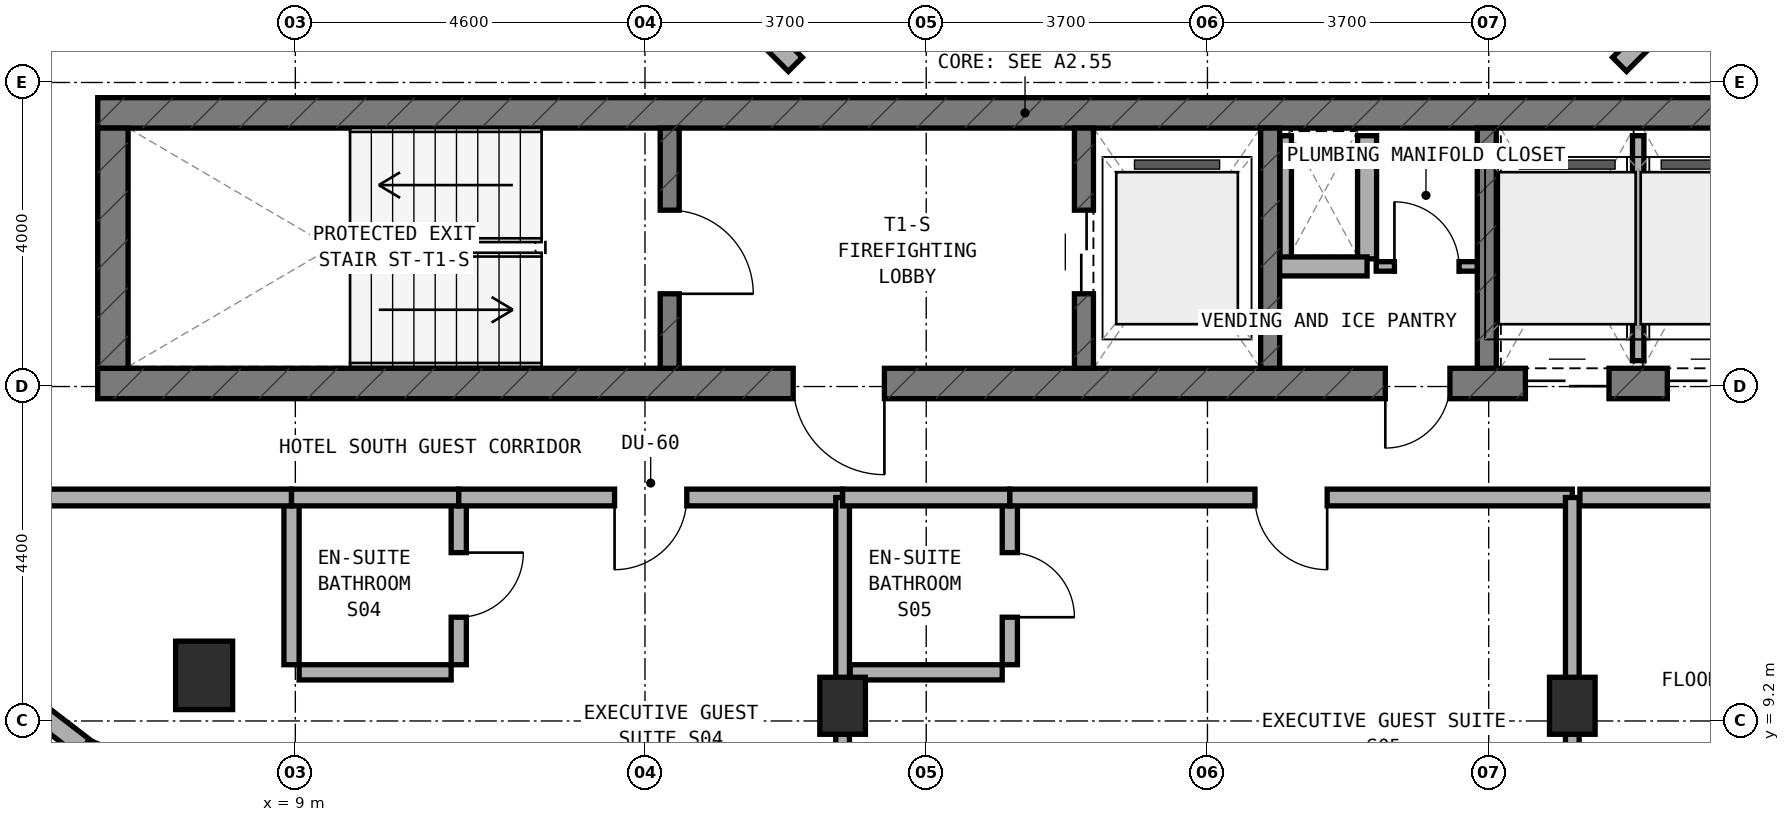
"""IFC4 building model, lengths in metres.
Left out: names, types, materials, properties, quantities, classifications, styles, units other than length and angle.
Written with IfcOpenShell. Run it as: python <this file> out.ifc"""

import sys

from ifc_helpers import new_model, si_unit, direction, frame, frame_2d, origin, origin_2d, place, context, subcontext, project, spatial, rectangle, extrude, element, fill, save


model = new_model("IFC4")
c1 = context("Model", 3, precision=1e-05, world=origin(), true_north=direction((0.0, 1.0)))
c2 = subcontext(c1, "Body", "Model", "MODEL_VIEW")
j1 = project(units=[si_unit("LENGTHUNIT", "METRE"), si_unit("PLANEANGLEUNIT", "RADIAN")], contexts=[c1])
p1 = place(None, origin())
s1 = spatial("IfcSite", under=j1, at=p1, CompositionType="ELEMENT")
p2 = place(p1, origin())
s2 = spatial("IfcBuilding", under=s1, at=p2, CompositionType="ELEMENT")
p3 = place(p2, frame((0.0, 0.0, 254.0)))
s3 = spatial("IfcBuildingStorey", under=s2, at=p3, CompositionType="ELEMENT", Elevation=254.0)
p4 = place(p3, frame((6.4, 13.64, 0.0), z_axis=(0.0, 0.0, 1.0), x_axis=(1.0, 0.0, 0.0)))
e1 = element("IfcWall", 1, at=p4, inside=s3, PredefinedType="SHEAR", context=c2, shape_type="SweptSolid", body=[
    extrude(rectangle(XDim=24.4, YDim=0.4, at=frame_2d((12.2, 0.0))), origin(), (0.0, 0.0, 1.0), 3.6),
])
p5 = place(p4, frame((9.15, 0.0, 0.0)))
e2 = element("IfcOpeningElement", 2, at=p5, cuts=e1, PredefinedType="OPENING", context=c2, shape_type="SweptSolid", body=[
    extrude(rectangle(XDim=1.2, YDim=2.15, at=frame_2d((0.6, 1.075))), frame((0.0, 0.21, 0.0), z_axis=(0.0, -1.0, 0.0), x_axis=(1.0, 0.0, 0.0)), (0.0, 0.0, 1.0), 0.42),
])
p6 = place(p4, frame((16.94, 0.0, 0.0)))
e3 = element("IfcOpeningElement", 3, at=p6, cuts=e1, PredefinedType="OPENING", context=c2, shape_type="SweptSolid", body=[
    extrude(rectangle(XDim=0.85, YDim=2.1, at=frame_2d((0.425, 1.05))), frame((0.0, 0.21, 0.0), z_axis=(0.0, -1.0, 0.0), x_axis=(1.0, 0.0, 0.0)), (0.0, 0.0, 1.0), 0.42),
])
p7 = place(p4, frame((18.783, 0.0, 0.0)))
e4 = element("IfcOpeningElement", 4, at=p7, cuts=e1, PredefinedType="OPENING", context=c2, shape_type="SweptSolid", body=[
    extrude(rectangle(XDim=1.1, YDim=2.15, at=frame_2d((0.55, 1.075))), frame((0.0, 0.21, 0.0), z_axis=(0.0, -1.0, 0.0), x_axis=(1.0, 0.0, 0.0)), (0.0, 0.0, 1.0), 0.42),
])
p8 = place(p4, frame((20.65, 0.0, 0.0)))
e5 = element("IfcOpeningElement", 5, at=p8, cuts=e1, PredefinedType="OPENING", context=c2, shape_type="SweptSolid", body=[
    extrude(rectangle(XDim=1.1, YDim=2.15, at=frame_2d((0.55, 1.075))), frame((0.0, 0.21, 0.0), z_axis=(0.0, -1.0, 0.0), x_axis=(1.0, 0.0, 0.0)), (0.0, 0.0, 1.0), 0.42),
])
p9 = place(p4, frame((22.517, 0.0, 0.0)))
e6 = element("IfcOpeningElement", 6, at=p9, cuts=e1, PredefinedType="OPENING", context=c2, shape_type="SweptSolid", body=[
    extrude(rectangle(XDim=1.1, YDim=2.15, at=frame_2d((0.55, 1.075))), frame((0.0, 0.21, 0.0), z_axis=(0.0, -1.0, 0.0), x_axis=(1.0, 0.0, 0.0)), (0.0, 0.0, 1.0), 0.42),
])
p10 = place(p3, frame((6.4, 17.2, 0.0), z_axis=(0.0, 0.0, 1.0), x_axis=(1.0, 0.0, 0.0)))
e7 = element("IfcWall", 7, at=p10, inside=s3, PredefinedType="SHEAR", context=c2, shape_type="SweptSolid", body=[
    extrude(rectangle(XDim=24.4, YDim=0.4, at=frame_2d((12.2, 0.0))), origin(), (0.0, 0.0, 1.0), 3.6),
])
p11 = place(p3, frame((6.6, 13.84, 0.0), z_axis=(0.0, 0.0, 1.0), x_axis=(0.0, 1.0, 0.0)))
e8 = element("IfcWall", 8, at=p11, inside=s3, PredefinedType="SHEAR", context=c2, shape_type="SweptSolid", body=[
    extrude(rectangle(XDim=3.16, YDim=0.4, at=frame_2d((1.58, 0.0))), origin(), (0.0, 0.0, 1.0), 3.6),
])
p12 = place(p3, frame((13.925, 13.84, 0.0), z_axis=(0.0, 0.0, 1.0), x_axis=(0.0, 1.0, 0.0)))
e9 = element("IfcWall", 9, at=p12, inside=s3, PredefinedType="STANDARD", context=c2, shape_type="SweptSolid", body=[
    extrude(rectangle(XDim=3.16, YDim=0.25, at=frame_2d((1.58, 0.0))), origin(), (0.0, 0.0, 1.0), 3.32),
])
p13 = place(p12, frame((0.98, 0.0, 0.0)))
e10 = element("IfcOpeningElement", 10, at=p13, cuts=e9, PredefinedType="OPENING", context=c2, shape_type="SweptSolid", body=[
    extrude(rectangle(XDim=1.1, YDim=2.15, at=frame_2d((0.55, 1.075))), frame((0.0, 0.135, 0.0), z_axis=(0.0, -1.0, 0.0), x_axis=(1.0, 0.0, 0.0)), (0.0, 0.0, 1.0), 0.27),
])
p14 = place(p3, frame((19.375, 13.84, 0.0), z_axis=(0.0, 0.0, 1.0), x_axis=(0.0, 1.0, 0.0)))
e11 = element("IfcWall", 11, at=p14, inside=s3, PredefinedType="STANDARD", context=c2, shape_type="SweptSolid", body=[
    extrude(rectangle(XDim=3.16, YDim=0.25, at=frame_2d((1.58, 0.0))), origin(), (0.0, 0.0, 1.0), 3.32),
])
p15 = place(p14, frame((0.98, 0.0, 0.0)))
e12 = element("IfcOpeningElement", 12, at=p15, cuts=e11, PredefinedType="OPENING", context=c2, shape_type="SweptSolid", body=[
    extrude(rectangle(XDim=1.1, YDim=2.15, at=frame_2d((0.55, 1.075))), frame((0.0, 0.135, 0.0), z_axis=(0.0, -1.0, 0.0), x_axis=(1.0, 0.0, 0.0)), (0.0, 0.0, 1.0), 0.27),
])
for number, where, z_axis, x_axis in (
    (13, (21.825, 13.84, 0.0), (0.0, 0.0, 1.0), (0.0, 1.0, 0.0)),
    (14, (24.675, 13.84, 0.0), (0.0, 0.0, 1.0), (0.0, 1.0, 0.0)),
):
    element("IfcWall", number, at=place(p3, frame(where, z_axis=z_axis, x_axis=x_axis)), inside=s3, PredefinedType="STANDARD", context=c2, shape_type="SweptSolid", body=[
        extrude(rectangle(XDim=3.16, YDim=0.25, at=frame_2d((1.58, 0.0))), origin(), (0.0, 0.0, 1.0), 3.32),
    ])
for number, where, z_axis, x_axis in (
    (15, (16.2, 9.4, 0.0), (0.0, 0.0, 1.0), (1.0, 0.0, 0.0)),
    (16, (25.8, 9.4, 0.0), (0.0, 0.0, 1.0), (1.0, 0.0, 0.0)),
):
    element("IfcColumn", number, at=place(p3, frame(where, z_axis=z_axis, x_axis=x_axis)), inside=s3, PredefinedType="COLUMN", context=c2, shape_type="SweptSolid", body=[
        extrude(rectangle(XDim=0.6, YDim=0.75, at=origin_2d()), origin(), (0.0, 0.0, 1.0), 3.6),
    ])
p16 = place(p3, frame((7.8, 9.8, 0.0), z_axis=(0.0, 0.0, 1.0), x_axis=(1.0, 0.0, 0.0)))
e17 = element("IfcColumn", 17, at=p16, inside=s3, PredefinedType="COLUMN", context=c2, shape_type="SweptSolid", body=[
    extrude(rectangle(XDim=0.75, YDim=0.9, at=origin_2d()), origin(), (0.0, 0.0, 1.0), 3.6),
])
p17 = place(p3, frame((5.638, 9.297, 0.0), z_axis=(0.0, 0.0, 1.0), x_axis=(0.793158129381, -0.609015748398, 0.0)))
e18 = element("IfcWall", 18, at=p17, inside=s3, PredefinedType="STANDARD", context=c2, shape_type="SweptSolid", body=[
    extrude(rectangle(XDim=0.798, YDim=0.26, at=frame_2d((0.399, 0.0))), origin(), (0.0, 0.0, 1.0), 3.32),
])
p18 = place(p3, frame((6.227, 8.832, 0.0), z_axis=(0.0, 0.0, 1.0), x_axis=(0.923681457047, -0.383161279238, 0.0)))
e19 = element("IfcWall", 19, at=p18, inside=s3, PredefinedType="STANDARD", context=c2, shape_type="SweptSolid", body=[
    extrude(rectangle(XDim=0.799, YDim=0.26, at=frame_2d((0.399, 0.0))), origin(), (0.0, 0.0, 1.0), 3.32),
])
for number, where, z_axis, x_axis in (
    (20, (26.422, 17.838, 0.0), (0.0, 0.0, 1.0), (0.707, 0.707, 0.0)),
    (21, (13.944, 19.472, 0.0), (0.0, 0.0, 1.0), (0.707, -0.707, 0.0)),
):
    element("IfcWall", number, at=place(p3, frame(where, z_axis=z_axis, x_axis=x_axis)), inside=s3, PredefinedType="STANDARD", context=c2, shape_type="SweptSolid", body=[
        extrude(rectangle(XDim=2.311, YDim=0.26, at=frame_2d((1.155, 0.0))), origin(), (0.0, 0.0, 1.0), 3.32),
    ])
p19 = place(p3, frame((22.03, 15.28, 0.0), z_axis=(0.0, 0.0, 1.0), x_axis=(0.0, 1.0, 0.0)))
e22 = element("IfcWall", 22, at=p19, inside=s3, PredefinedType="PARTITIONING", context=c2, shape_type="SweptSolid", body=[
    extrude(rectangle(XDim=1.62, YDim=0.15, at=frame_2d((0.81, 0.0))), origin(), (0.0, 0.0, 1.0), 3.32),
])
p20 = place(p3, frame((23.1, 15.28, 0.0), z_axis=(0.0, 0.0, 1.0), x_axis=(0.0, 1.0, 0.0)))
e23 = element("IfcWall", 23, at=p20, inside=s3, PredefinedType="SOLIDWALL", context=c2, shape_type="SweptSolid", body=[
    extrude(rectangle(XDim=1.62, YDim=0.25, at=frame_2d((0.81, 0.0))), origin(), (0.0, 0.0, 1.0), 3.32),
])
p21 = place(p3, frame((21.95, 15.18, 0.0), z_axis=(0.0, 0.0, 1.0), x_axis=(1.0, 0.0, 0.0)))
e24 = element("IfcWall", 24, at=p21, inside=s3, PredefinedType="SOLIDWALL", context=c2, shape_type="SweptSolid", body=[
    extrude(rectangle(XDim=1.15, YDim=0.25, at=frame_2d((0.575, 0.0))), origin(), (0.0, 0.0, 1.0), 3.32),
])
p22 = place(p3, frame((23.22, 15.18, 0.0), z_axis=(0.0, 0.0, 1.0), x_axis=(1.0, 0.0, 0.0)))
e25 = element("IfcWall", 25, at=p22, inside=s3, PredefinedType="PARTITIONING", context=c2, shape_type="SweptSolid", body=[
    extrude(rectangle(XDim=1.33, YDim=0.125, at=frame_2d((0.665, 0.0))), origin(), (0.0, 0.0, 1.0), 3.32),
])
p23 = place(p22, frame((0.24, 0.0, 0.0)))
e26 = element("IfcOpeningElement", 26, at=p23, cuts=e25, PredefinedType="OPENING", context=c2, shape_type="SweptSolid", body=[
    extrude(rectangle(XDim=0.85, YDim=2.1, at=frame_2d((0.425, 1.05))), frame((0.0, 0.073, 0.0), z_axis=(0.0, -1.0, 0.0), x_axis=(1.0, 0.0, 0.0)), (0.0, 0.0, 1.0), 0.145),
])
p24 = place(p3, frame((26.667, 13.94, 0.0), z_axis=(0.0, 0.0, 1.0), x_axis=(0.0, 1.0, 0.0)))
e27 = element("IfcWall", 27, at=p24, inside=s3, PredefinedType="PARTITIONING", context=c2, shape_type="SweptSolid", body=[
    extrude(rectangle(XDim=2.96, YDim=0.15, at=frame_2d((1.48, 0.0))), origin(), (0.0, 0.0, 1.0), 3.32),
])
p25 = place(p3, frame((11.15, 9.94, 0.0), z_axis=(0.0, 0.0, 1.0), x_axis=(0.0, 1.0, 0.0)))
e28 = element("IfcWall", 28, at=p25, inside=s3, PredefinedType="PLUMBINGWALL", context=c2, shape_type="SweptSolid", body=[
    extrude(rectangle(XDim=2.1, YDim=0.2, at=frame_2d((1.05, 0.0))), origin(), (0.0, 0.0, 1.0), 2.845),
])
p26 = place(p25, frame((0.625, 0.0, 0.0)))
e29 = element("IfcOpeningElement", 29, at=p26, cuts=e28, PredefinedType="OPENING", context=c2, shape_type="SweptSolid", body=[
    extrude(rectangle(XDim=0.85, YDim=2.1, at=frame_2d((0.425, 1.05))), frame((0.0, 0.11, 0.0), z_axis=(0.0, -1.0, 0.0), x_axis=(1.0, 0.0, 0.0)), (0.0, 0.0, 1.0), 0.22),
])
p27 = place(p3, frame((9.05, 9.84, 0.0), z_axis=(0.0, 0.0, 1.0), x_axis=(1.0, 0.0, 0.0)))
e30 = element("IfcWall", 30, at=p27, inside=s3, PredefinedType="PLUMBINGWALL", context=c2, shape_type="SweptSolid", body=[
    extrude(rectangle(XDim=2.0, YDim=0.2, at=frame_2d((1.0, 0.0))), origin(), (0.0, 0.0, 1.0), 3.015),
])
p28 = place(p3, frame((8.95, 9.94, 0.0), z_axis=(0.0, 0.0, 1.0), x_axis=(0.0, 1.0, 0.0)))
e31 = element("IfcWall", 31, at=p28, inside=s3, PredefinedType="PLUMBINGWALL", context=c2, shape_type="SweptSolid", body=[
    extrude(rectangle(XDim=2.1, YDim=0.2, at=frame_2d((1.05, 0.0))), origin(), (0.0, 0.0, 1.0), 2.845),
])
p29 = place(p3, frame((3.36, 12.14, 0.0), z_axis=(0.0, 0.0, 1.0), x_axis=(1.0, 0.0, 0.0)))
e32 = element("IfcWall", 32, at=p29, inside=s3, PredefinedType="SOLIDWALL", context=c2, shape_type="SweptSolid", body=[
    extrude(rectangle(XDim=5.59, YDim=0.22, at=frame_2d((2.795, 0.0))), origin(), (0.0, 0.0, 1.0), 2.745),
])
p30 = place(p3, frame((8.95, 12.14, 0.0), z_axis=(0.0, 0.0, 1.0), x_axis=(1.0, 0.0, 0.0)))
e33 = element("IfcWall", 33, at=p30, inside=s3, PredefinedType="SOLIDWALL", context=c2, shape_type="SweptSolid", body=[
    extrude(rectangle(XDim=2.2, YDim=0.22, at=frame_2d((1.1, 0.0))), origin(), (0.0, 0.0, 1.0), 3.32),
])
p31 = place(p3, frame((11.15, 12.14, 0.0), z_axis=(0.0, 0.0, 1.0), x_axis=(1.0, 0.0, 0.0)))
e34 = element("IfcWall", 34, at=p31, inside=s3, PredefinedType="SOLIDWALL", context=c2, shape_type="SweptSolid", body=[
    extrude(rectangle(XDim=5.05, YDim=0.22, at=frame_2d((2.525, 0.0))), origin(), (0.0, 0.0, 1.0), 2.745),
])
p32 = place(p31, frame((2.05, 0.0, 0.0)))
e35 = element("IfcOpeningElement", 35, at=p32, cuts=e34, PredefinedType="OPENING", context=c2, shape_type="SweptSolid", body=[
    extrude(rectangle(XDim=0.95, YDim=2.1, at=frame_2d((0.475, 1.05))), frame((0.0, 0.12, 0.0), z_axis=(0.0, -1.0, 0.0), x_axis=(1.0, 0.0, 0.0)), (0.0, 0.0, 1.0), 0.24),
])
p33 = place(p3, frame((16.2, 6.86, 0.0), z_axis=(0.0, 0.0, 1.0), x_axis=(0.0, 1.0, 0.0)))
e36 = element("IfcWall", 36, at=p33, inside=s3, PredefinedType="SOLIDWALL", context=c2, shape_type="SweptSolid", body=[
    extrude(rectangle(XDim=5.28, YDim=0.18, at=frame_2d((2.64, 0.0))), origin(), (0.0, 0.0, 1.0), 2.745),
])
p34 = place(p3, frame((18.4, 9.94, 0.0), z_axis=(0.0, 0.0, 1.0), x_axis=(0.0, 1.0, 0.0)))
e37 = element("IfcWall", 37, at=p34, inside=s3, PredefinedType="PLUMBINGWALL", context=c2, shape_type="SweptSolid", body=[
    extrude(rectangle(XDim=2.1, YDim=0.2, at=frame_2d((1.05, 0.0))), origin(), (0.0, 0.0, 1.0), 2.845),
])
p35 = place(p34, frame((0.625, 0.0, 0.0)))
e38 = element("IfcOpeningElement", 38, at=p35, cuts=e37, PredefinedType="OPENING", context=c2, shape_type="SweptSolid", body=[
    extrude(rectangle(XDim=0.85, YDim=2.1, at=frame_2d((0.425, 1.05))), frame((0.0, 0.11, 0.0), z_axis=(0.0, -1.0, 0.0), x_axis=(1.0, 0.0, 0.0)), (0.0, 0.0, 1.0), 0.22),
])
p36 = place(p3, frame((16.3, 9.84, 0.0), z_axis=(0.0, 0.0, 1.0), x_axis=(1.0, 0.0, 0.0)))
e39 = element("IfcWall", 39, at=p36, inside=s3, PredefinedType="PLUMBINGWALL", context=c2, shape_type="SweptSolid", body=[
    extrude(rectangle(XDim=2.0, YDim=0.2, at=frame_2d((1.0, 0.0))), origin(), (0.0, 0.0, 1.0), 3.32),
])
p37 = place(p3, frame((16.2, 12.14, 0.0), z_axis=(0.0, 0.0, 1.0), x_axis=(1.0, 0.0, 0.0)))
e40 = element("IfcWall", 40, at=p37, inside=s3, PredefinedType="SOLIDWALL", context=c2, shape_type="SweptSolid", body=[
    extrude(rectangle(XDim=2.2, YDim=0.22, at=frame_2d((1.1, 0.0))), origin(), (0.0, 0.0, 1.0), 2.745),
])
p38 = place(p3, frame((18.4, 12.14, 0.0), z_axis=(0.0, 0.0, 1.0), x_axis=(1.0, 0.0, 0.0)))
e41 = element("IfcWall", 41, at=p38, inside=s3, PredefinedType="SOLIDWALL", context=c2, shape_type="SweptSolid", body=[
    extrude(rectangle(XDim=7.4, YDim=0.22, at=frame_2d((3.7, 0.0))), origin(), (0.0, 0.0, 1.0), 2.745),
])
p39 = place(p38, frame((3.225, 0.0, 0.0)))
e42 = element("IfcOpeningElement", 42, at=p39, cuts=e41, PredefinedType="OPENING", context=c2, shape_type="SweptSolid", body=[
    extrude(rectangle(XDim=0.95, YDim=2.1, at=frame_2d((0.475, 1.05))), frame((0.0, 0.12, 0.0), z_axis=(0.0, -1.0, 0.0), x_axis=(1.0, 0.0, 0.0)), (0.0, 0.0, 1.0), 0.24),
])
p40 = place(p3, frame((25.8, 6.86, 0.0), z_axis=(0.0, 0.0, 1.0), x_axis=(0.0, 1.0, 0.0)))
e43 = element("IfcWall", 43, at=p40, inside=s3, PredefinedType="SOLIDWALL", context=c2, shape_type="SweptSolid", body=[
    extrude(rectangle(XDim=5.28, YDim=0.18, at=frame_2d((2.64, 0.0))), origin(), (0.0, 0.0, 1.0), 2.745),
])
p41 = place(p3, frame((25.9, 12.14, 0.0), z_axis=(0.0, 0.0, 1.0), x_axis=(1.0, 0.0, 0.0)))
e44 = element("IfcWall", 44, at=p41, inside=s3, PredefinedType="SOLIDWALL", context=c2, shape_type="SweptSolid", body=[
    extrude(rectangle(XDim=12.64, YDim=0.22, at=frame_2d((6.32, 0.0))), origin(), (0.0, 0.0, 1.0), 2.745),
])
p42 = place(p41, frame((5.251, 0.0, 0.0)))
e45 = element("IfcOpeningElement", 45, at=p42, cuts=e44, PredefinedType="OPENING", context=c2, shape_type="SweptSolid", body=[
    extrude(rectangle(XDim=0.95, YDim=2.1, at=frame_2d((0.475, 1.05))), frame((0.0, 0.12, 0.0), z_axis=(0.0, -1.0, 0.0), x_axis=(1.0, 0.0, 0.0)), (0.0, 0.0, 1.0), 0.24),
])
p43 = place(p13, frame((1.1, 0.0, 0.0), z_axis=(0.0, 0.0, 1.0), x_axis=(-1.0, 0.0, 0.0)))
e46 = element("IfcDoor", 46, at=p43, inside=s3, OperationType="SINGLE_SWING_RIGHT", PredefinedType="DOOR", context=c2, shape_type="SweptSolid", body=[
    extrude(rectangle(XDim=1.1, YDim=2.15, at=frame_2d((0.55, 1.075))), frame((0.0, 0.025, 0.0), z_axis=(0.0, -1.0, 0.0), x_axis=(1.0, 0.0, 0.0)), (0.0, 0.0, 1.0), 0.05),
])
fill(e10, e46)
p44 = place(p5, frame((1.2, 0.0, 0.0), z_axis=(0.0, 0.0, 1.0), x_axis=(-1.0, 0.0, 0.0)))
e47 = element("IfcDoor", 47, at=p44, inside=s3, OperationType="SINGLE_SWING_LEFT", PredefinedType="DOOR", context=c2, shape_type="SweptSolid", body=[
    extrude(rectangle(XDim=1.2, YDim=2.15, at=frame_2d((0.6, 1.075))), frame((0.0, 0.025, 0.0), z_axis=(0.0, -1.0, 0.0), x_axis=(1.0, 0.0, 0.0)), (0.0, 0.0, 1.0), 0.05),
])
fill(e2, e47)
p45 = place(p15, origin())
e48 = element("IfcDoor", 48, at=p45, inside=s3, OperationType="DOUBLE_DOOR_SLIDING", PredefinedType="DOOR", context=c2, shape_type="SweptSolid", body=[
    extrude(rectangle(XDim=1.1, YDim=2.15, at=frame_2d((0.55, 1.075))), frame((0.0, 0.025, 0.0), z_axis=(0.0, -1.0, 0.0), x_axis=(1.0, 0.0, 0.0)), (0.0, 0.0, 1.0), 0.05),
])
fill(e12, e48)
p46 = place(p6, frame((0.85, 0.0, 0.0), z_axis=(0.0, 0.0, 1.0), x_axis=(-1.0, 0.0, 0.0)))
e49 = element("IfcDoor", 49, at=p46, inside=s3, OperationType="SINGLE_SWING_RIGHT", PredefinedType="DOOR", context=c2, shape_type="SweptSolid", body=[
    extrude(rectangle(XDim=0.85, YDim=2.1, at=frame_2d((0.425, 1.05))), frame((0.0, 0.025, 0.0), z_axis=(0.0, -1.0, 0.0), x_axis=(1.0, 0.0, 0.0)), (0.0, 0.0, 1.0), 0.05),
])
fill(e3, e49)
p47 = place(p7, frame((1.1, 0.0, 0.0), z_axis=(0.0, 0.0, 1.0), x_axis=(-1.0, 0.0, 0.0)))
e50 = element("IfcDoor", 50, at=p47, inside=s3, OperationType="DOUBLE_DOOR_SLIDING", PredefinedType="DOOR", context=c2, shape_type="SweptSolid", body=[
    extrude(rectangle(XDim=1.1, YDim=2.15, at=frame_2d((0.55, 1.075))), frame((0.0, 0.025, 0.0), z_axis=(0.0, -1.0, 0.0), x_axis=(1.0, 0.0, 0.0)), (0.0, 0.0, 1.0), 0.05),
])
fill(e4, e50)
p48 = place(p8, frame((1.1, 0.0, 0.0), z_axis=(0.0, 0.0, 1.0), x_axis=(-1.0, 0.0, 0.0)))
e51 = element("IfcDoor", 51, at=p48, inside=s3, OperationType="DOUBLE_DOOR_SLIDING", PredefinedType="DOOR", context=c2, shape_type="SweptSolid", body=[
    extrude(rectangle(XDim=1.1, YDim=2.15, at=frame_2d((0.55, 1.075))), frame((0.0, 0.025, 0.0), z_axis=(0.0, -1.0, 0.0), x_axis=(1.0, 0.0, 0.0)), (0.0, 0.0, 1.0), 0.05),
])
fill(e5, e51)
p49 = place(p23, origin())
e52 = element("IfcDoor", 52, at=p49, inside=s3, OperationType="SINGLE_SWING_LEFT", PredefinedType="DOOR", context=c2, shape_type="SweptSolid", body=[
    extrude(rectangle(XDim=0.85, YDim=2.1, at=frame_2d((0.425, 1.05))), frame((0.0, 0.025, 0.0), z_axis=(0.0, -1.0, 0.0), x_axis=(1.0, 0.0, 0.0)), (0.0, 0.0, 1.0), 0.05),
])
fill(e26, e52)
p50 = place(p26, frame((0.85, 0.0, 0.0), z_axis=(0.0, 0.0, 1.0), x_axis=(-1.0, 0.0, 0.0)))
e53 = element("IfcDoor", 53, at=p50, inside=s3, OperationType="SINGLE_SWING_LEFT", PredefinedType="DOOR", context=c2, shape_type="SweptSolid", body=[
    extrude(rectangle(XDim=0.85, YDim=2.1, at=frame_2d((0.425, 1.05))), frame((0.0, 0.025, 0.0), z_axis=(0.0, -1.0, 0.0), x_axis=(1.0, 0.0, 0.0)), (0.0, 0.0, 1.0), 0.05),
])
fill(e29, e53)
p51 = place(p32, frame((0.95, 0.0, 0.0), z_axis=(0.0, 0.0, 1.0), x_axis=(-1.0, 0.0, 0.0)))
e54 = element("IfcDoor", 54, at=p51, inside=s3, OperationType="SINGLE_SWING_RIGHT", PredefinedType="DOOR", context=c2, shape_type="SweptSolid", body=[
    extrude(rectangle(XDim=0.95, YDim=2.1, at=frame_2d((0.475, 1.05))), frame((0.0, 0.025, 0.0), z_axis=(0.0, -1.0, 0.0), x_axis=(1.0, 0.0, 0.0)), (0.0, 0.0, 1.0), 0.05),
])
fill(e35, e54)
p52 = place(p35, frame((0.85, 0.0, 0.0), z_axis=(0.0, 0.0, 1.0), x_axis=(-1.0, 0.0, 0.0)))
e55 = element("IfcDoor", 55, at=p52, inside=s3, OperationType="SINGLE_SWING_RIGHT", PredefinedType="DOOR", context=c2, shape_type="SweptSolid", body=[
    extrude(rectangle(XDim=0.85, YDim=2.1, at=frame_2d((0.425, 1.05))), frame((0.0, 0.025, 0.0), z_axis=(0.0, -1.0, 0.0), x_axis=(1.0, 0.0, 0.0)), (0.0, 0.0, 1.0), 0.05),
])
fill(e38, e55)
p53 = place(p39, frame((0.95, 0.0, 0.0), z_axis=(0.0, 0.0, 1.0), x_axis=(-1.0, 0.0, 0.0)))
e56 = element("IfcDoor", 56, at=p53, inside=s3, OperationType="SINGLE_SWING_LEFT", PredefinedType="DOOR", context=c2, shape_type="SweptSolid", body=[
    extrude(rectangle(XDim=0.95, YDim=2.1, at=frame_2d((0.475, 1.05))), frame((0.0, 0.025, 0.0), z_axis=(0.0, -1.0, 0.0), x_axis=(1.0, 0.0, 0.0)), (0.0, 0.0, 1.0), 0.05),
])
fill(e42, e56)
save(model, sys.argv[1])
